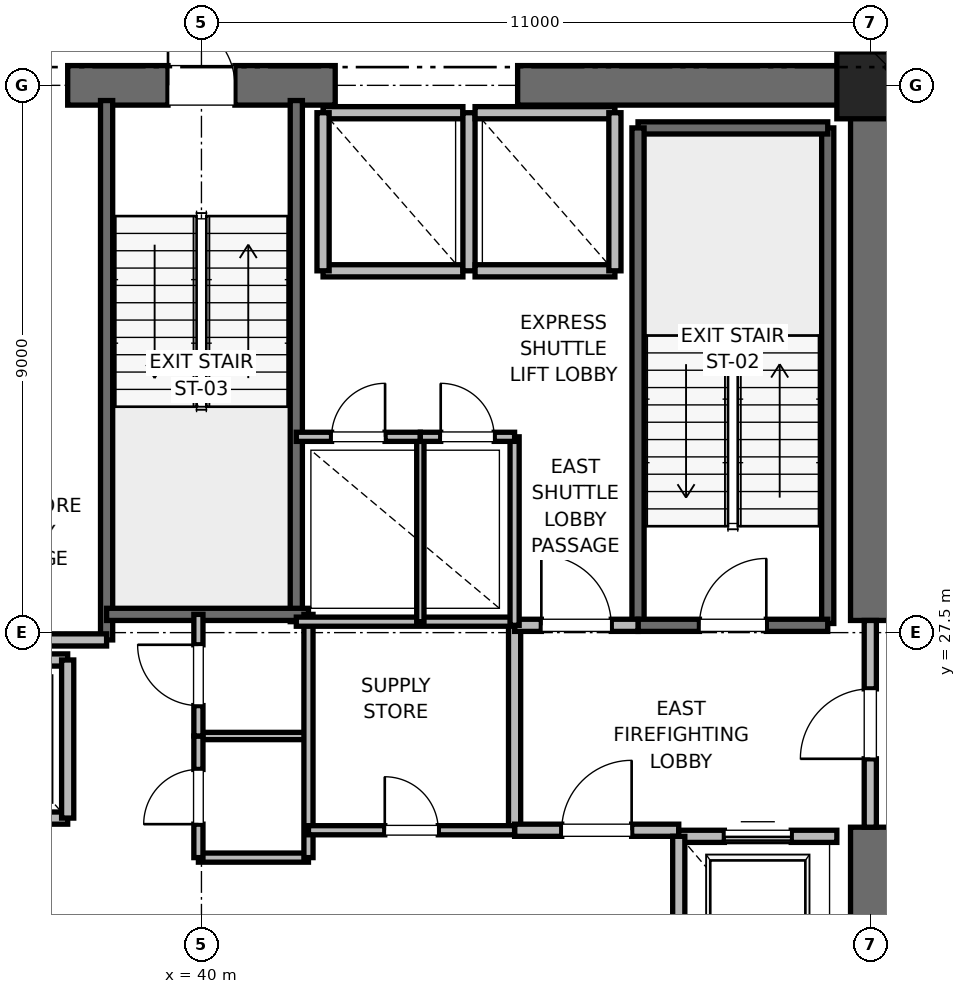
"""IFC4 building model, lengths in metres.
Left out: names, types, materials, properties, quantities, classifications, styles, units other than length and angle.
Written with IfcOpenShell. Run it as: python <this file> out.ifc"""

import sys

from ifc_helpers import new_model, si_unit, direction, frame, frame_2d, origin, origin_2d, place, context, subcontext, project, spatial, rectangle, extrude, element, fill, save


model = new_model("IFC4")
c1 = context("Model", 3, precision=1e-05, world=origin(), true_north=direction((0.0, 1.0)))
c2 = subcontext(c1, "Body", "Model", "MODEL_VIEW")
j1 = project(units=[si_unit("LENGTHUNIT", "METRE"), si_unit("PLANEANGLEUNIT", "RADIAN")], contexts=[c1])
p1 = place(None, origin())
s1 = spatial("IfcSite", under=j1, at=p1, CompositionType="ELEMENT")
p2 = place(p1, origin())
s2 = spatial("IfcBuilding", under=s1, at=p2, CompositionType="ELEMENT")
p3 = place(p2, frame((0.0, 0.0, 39.6)))
s3 = spatial("IfcBuildingStorey", under=s2, at=p3, CompositionType="ELEMENT", Elevation=39.6)
p4 = place(p3, frame((51.0, 36.5, 0.0), z_axis=(0.0, 0.0, 1.0), x_axis=(1.0, 0.0, 0.0)))
e1 = element("IfcColumn", 1, at=p4, inside=s3, PredefinedType="PILASTER", context=c2, shape_type="SweptSolid", body=[
    extrude(rectangle(XDim=1.1, YDim=1.1, at=origin_2d()), origin(), (0.0, 0.0, 1.0), 4.0),
])
p5 = place(p3, frame((37.8, 36.5, 0.0), z_axis=(0.0, 0.0, 1.0), x_axis=(1.0, 0.0, 0.0)))
e2 = element("IfcWall", 2, at=p5, inside=s3, PredefinedType="SHEAR", context=c2, shape_type="SweptSolid", body=[
    extrude(rectangle(XDim=4.4, YDim=0.65, at=frame_2d((2.2, 0.0))), origin(), (0.0, 0.0, 1.0), 3.76),
])
p6 = place(p5, frame((1.65, 0.0, 0.0)))
e3 = element("IfcOpeningElement", 3, at=p6, cuts=e2, PredefinedType="OPENING", context=c2, shape_type="SweptSolid", body=[
    extrude(rectangle(XDim=1.1, YDim=2.15, at=frame_2d((0.55, 1.075))), frame((0.0, 0.325, 0.0), z_axis=(0.0, -1.0, 0.0), x_axis=(1.0, 0.0, 0.0)), (0.0, 0.0, 1.0), 0.65),
])
for number, where, z_axis, x_axis in (
    (4, (45.2, 36.5, 0.0), (0.0, 0.0, 1.0), (1.0, 0.0, 0.0)),
    (5, (51.0, 18.5, 0.0), (0.0, 0.0, 1.0), (0.0, 1.0, 0.0)),
):
    element("IfcWall", number, at=place(p3, frame(where, z_axis=z_axis, x_axis=x_axis)), inside=s3, PredefinedType="SHEAR", context=c2, shape_type="SweptSolid", body=[
        extrude(rectangle(XDim=5.8, YDim=0.65, at=frame_2d((2.9, 0.0))), origin(), (0.0, 0.0, 1.0), 3.76),
    ])
p7 = place(p3, frame((51.0, 27.7, 0.0), z_axis=(0.0, 0.0, 1.0), x_axis=(0.0, 1.0, 0.0)))
e6 = element("IfcWall", 6, at=p7, inside=s3, PredefinedType="SHEAR", context=c2, shape_type="SweptSolid", body=[
    extrude(rectangle(XDim=8.8, YDim=0.65, at=frame_2d((4.4, 0.0))), origin(), (0.0, 0.0, 1.0), 3.76),
])
p8 = place(p3, frame((50.3, 27.65, 0.0), z_axis=(0.0, 0.0, 1.0), x_axis=(0.0, 1.0, 0.0)))
e7 = element("IfcWall", 7, at=p8, inside=s3, PredefinedType="SOLIDWALL", context=c2, shape_type="SweptSolid", body=[
    extrude(rectangle(XDim=8.15, YDim=0.2, at=frame_2d((4.075, 0.0))), origin(), (0.0, 0.0, 1.0), 3.76),
])
p9 = place(p3, frame((47.18, 35.8, 0.0), z_axis=(0.0, 0.0, 1.0), x_axis=(1.0, 0.0, 0.0)))
e8 = element("IfcWall", 8, at=p9, inside=s3, PredefinedType="SOLIDWALL", context=c2, shape_type="SweptSolid", body=[
    extrude(rectangle(XDim=3.12, YDim=0.2, at=frame_2d((1.56, 0.0))), origin(), (0.0, 0.0, 1.0), 3.76),
])
p10 = place(p3, frame((47.18, 27.62, 0.0), z_axis=(0.0, 0.0, 1.0), x_axis=(0.0, 1.0, 0.0)))
e9 = element("IfcWall", 9, at=p10, inside=s3, PredefinedType="SOLIDWALL", context=c2, shape_type="SweptSolid", body=[
    extrude(rectangle(XDim=8.18, YDim=0.2, at=frame_2d((4.09, 0.0))), origin(), (0.0, 0.0, 1.0), 3.76),
])
p11 = place(p3, frame((47.18, 27.62, 0.0), z_axis=(0.0, 0.0, 1.0), x_axis=(1.0, 0.0, 0.0)))
e10 = element("IfcWall", 10, at=p11, inside=s3, PredefinedType="SOLIDWALL", context=c2, shape_type="SweptSolid", body=[
    extrude(rectangle(XDim=3.12, YDim=0.2, at=frame_2d((1.56, 0.0))), origin(), (0.0, 0.0, 1.0), 3.76),
])
p12 = place(p11, frame((1.01, 0.0, 0.0)))
e11 = element("IfcOpeningElement", 11, at=p12, cuts=e10, PredefinedType="OPENING", context=c2, shape_type="SweptSolid", body=[
    extrude(rectangle(XDim=1.1, YDim=2.15, at=frame_2d((0.55, 1.075))), frame((0.0, 0.1, 0.0), z_axis=(0.0, -1.0, 0.0), x_axis=(1.0, 0.0, 0.0)), (0.0, 0.0, 1.0), 0.2),
])
p13 = place(p3, frame((38.44, 27.38, 0.0), z_axis=(0.0, 0.0, 1.0), x_axis=(0.0, 1.0, 0.0)))
e12 = element("IfcWall", 12, at=p13, inside=s3, PredefinedType="SOLIDWALL", context=c2, shape_type="SweptSolid", body=[
    extrude(rectangle(XDim=8.87, YDim=0.2, at=frame_2d((4.435, 0.0))), origin(), (0.0, 0.0, 1.0), 3.76),
])
p14 = place(p3, frame((41.56, 27.68, 0.0), z_axis=(0.0, 0.0, 1.0), x_axis=(0.0, 1.0, 0.0)))
e13 = element("IfcWall", 13, at=p14, inside=s3, PredefinedType="SOLIDWALL", context=c2, shape_type="SweptSolid", body=[
    extrude(rectangle(XDim=8.57, YDim=0.2, at=frame_2d((4.285, 0.0))), origin(), (0.0, 0.0, 1.0), 3.76),
])
p15 = place(p3, frame((38.44, 27.8, 0.0), z_axis=(0.0, 0.0, 1.0), x_axis=(1.0, 0.0, 0.0)))
e14 = element("IfcWall", 14, at=p15, inside=s3, PredefinedType="SOLIDWALL", context=c2, shape_type="SweptSolid", body=[
    extrude(rectangle(XDim=3.32, YDim=0.2, at=frame_2d((1.66, 0.0))), origin(), (0.0, 0.0, 1.0), 3.76),
])
p16 = place(p3, frame((32.82, 27.38, 0.0), z_axis=(0.0, 0.0, 1.0), x_axis=(1.0, 0.0, 0.0)))
e15 = element("IfcWall", 15, at=p16, inside=s3, PredefinedType="PARTITIONING", context=c2, shape_type="SweptSolid", body=[
    extrude(rectangle(XDim=5.62, YDim=0.2, at=frame_2d((2.81, 0.0))), origin(), (0.0, 0.0, 1.0), 3.76),
])
p17 = place(p3, frame((45.15, 24.25, 0.0), z_axis=(0.0, 0.0, 1.0), x_axis=(0.0, 1.0, 0.0)))
e16 = element("IfcWall", 16, at=p17, inside=s3, PredefinedType="PARTITIONING", context=c2, shape_type="SweptSolid", body=[
    extrude(rectangle(XDim=3.37, YDim=0.2, at=frame_2d((1.685, 0.0))), origin(), (0.0, 0.0, 1.0), 3.76),
])
p18 = place(p3, frame((45.15, 24.25, 0.0), z_axis=(0.0, 0.0, 1.0), x_axis=(1.0, 0.0, 0.0)))
e17 = element("IfcWall", 17, at=p18, inside=s3, PredefinedType="PARTITIONING", context=c2, shape_type="SweptSolid", body=[
    extrude(rectangle(XDim=2.7, YDim=0.2, at=frame_2d((1.35, 0.0))), origin(), (0.0, 0.0, 1.0), 3.76),
])
p19 = place(p18, frame((0.775, 0.0, 0.0)))
e18 = element("IfcOpeningElement", 18, at=p19, cuts=e17, PredefinedType="OPENING", context=c2, shape_type="SweptSolid", body=[
    extrude(rectangle(XDim=1.15, YDim=2.2, at=frame_2d((0.575, 1.1))), frame((0.0, 0.1, 0.0), z_axis=(0.0, -1.0, 0.0), x_axis=(1.0, 0.0, 0.0)), (0.0, 0.0, 1.0), 0.2),
])
p20 = place(p3, frame((45.15, 27.62, 0.0), z_axis=(0.0, 0.0, 1.0), x_axis=(1.0, 0.0, 0.0)))
e19 = element("IfcWall", 19, at=p20, inside=s3, PredefinedType="PARTITIONING", context=c2, shape_type="SweptSolid", body=[
    extrude(rectangle(XDim=2.03, YDim=0.2, at=frame_2d((1.015, 0.0))), origin(), (0.0, 0.0, 1.0), 3.76),
])
p21 = place(p20, frame((0.44, 0.0, 0.0)))
e20 = element("IfcOpeningElement", 20, at=p21, cuts=e19, PredefinedType="OPENING", context=c2, shape_type="SweptSolid", body=[
    extrude(rectangle(XDim=1.15, YDim=2.2, at=frame_2d((0.575, 1.1))), frame((0.0, 0.1, 0.0), z_axis=(0.0, -1.0, 0.0), x_axis=(1.0, 0.0, 0.0)), (0.0, 0.0, 1.0), 0.2),
])
p22 = place(p3, frame((51.0, 24.3, 0.0), z_axis=(0.0, 0.0, 1.0), x_axis=(0.0, 1.0, 0.0)))
e21 = element("IfcWall", 21, at=p22, inside=s3, PredefinedType="PARTITIONING", context=c2, shape_type="SweptSolid", body=[
    extrude(rectangle(XDim=3.4, YDim=0.2, at=frame_2d((1.7, 0.0))), origin(), (0.0, 0.0, 1.0), 2.54),
])
p23 = place(p22, frame((1.125, 0.0, 0.0)))
e22 = element("IfcOpeningElement", 22, at=p23, cuts=e21, PredefinedType="OPENING", context=c2, shape_type="SweptSolid", body=[
    extrude(rectangle(XDim=1.15, YDim=2.2, at=frame_2d((0.575, 1.1))), frame((0.0, 0.1, 0.0), z_axis=(0.0, -1.0, 0.0), x_axis=(1.0, 0.0, 0.0)), (0.0, 0.0, 1.0), 0.2),
])
p24 = place(p3, frame((50.45, 24.15, 0.0), z_axis=(0.0, 0.0, 1.0), x_axis=(-1.0, 0.0, 0.0)))
e23 = element("IfcWall", 23, at=p24, inside=s3, PredefinedType="SOLIDWALL", context=c2, shape_type="SweptSolid", body=[
    extrude(rectangle(XDim=2.6, YDim=0.2, at=frame_2d((1.3, 0.0))), origin(), (0.0, 0.0, 1.0), 2.54),
])
p25 = place(p24, frame((0.75, 0.0, 0.0)))
e24 = element("IfcOpeningElement", 24, at=p25, cuts=e23, PredefinedType="OPENING", context=c2, shape_type="SweptSolid", body=[
    extrude(rectangle(XDim=1.1, YDim=2.2, at=frame_2d((0.55, 1.1))), frame((0.0, 0.1, 0.0), z_axis=(0.0, -1.0, 0.0), x_axis=(1.0, 0.0, 0.0)), (0.0, 0.0, 1.0), 0.2),
])
p26 = place(p3, frame((47.85, 24.15, 0.0), z_axis=(0.0, 0.0, 1.0), x_axis=(0.0, -1.0, 0.0)))
e25 = element("IfcWall", 25, at=p26, inside=s3, PredefinedType="SOLIDWALL", context=c2, shape_type="SweptSolid", body=[
    extrude(rectangle(XDim=3.0, YDim=0.2, at=frame_2d((1.5, 0.0))), origin(), (0.0, 0.0, 1.0), 3.76),
])
p27 = place(p3, frame((35.5, 24.45, 0.0), z_axis=(0.0, 0.0, 1.0), x_axis=(1.0, 0.0, 0.0)))
e26 = element("IfcWall", 26, at=p27, inside=s3, PredefinedType="SOLIDWALL", context=c2, shape_type="SweptSolid", body=[
    extrude(rectangle(XDim=2.3, YDim=0.2, at=frame_2d((1.15, 0.0))), origin(), (0.0, 0.0, 1.0), 3.76),
])
p28 = place(p27, frame((0.6, 0.0, 0.0)))
e27 = element("IfcOpeningElement", 27, at=p28, cuts=e26, PredefinedType="OPENING", context=c2, shape_type="SweptSolid", body=[
    extrude(rectangle(XDim=1.1, YDim=2.2, at=frame_2d((0.55, 1.1))), frame((0.0, 0.1, 0.0), z_axis=(0.0, -1.0, 0.0), x_axis=(1.0, 0.0, 0.0)), (0.0, 0.0, 1.0), 0.2),
])
p29 = place(p3, frame((37.8, 27.05, 0.0), z_axis=(0.0, 0.0, 1.0), x_axis=(-1.0, 0.0, 0.0)))
e28 = element("IfcWall", 28, at=p29, inside=s3, PredefinedType="SOLIDWALL", context=c2, shape_type="SweptSolid", body=[
    extrude(rectangle(XDim=2.3, YDim=0.2, at=frame_2d((1.15, 0.0))), origin(), (0.0, 0.0, 1.0), 3.76),
])
p30 = place(p3, frame((37.8, 24.45, 0.0), z_axis=(0.0, 0.0, 1.0), x_axis=(0.0, 1.0, 0.0)))
e29 = element("IfcWall", 29, at=p30, inside=s3, PredefinedType="SOLIDWALL", context=c2, shape_type="SweptSolid", body=[
    extrude(rectangle(XDim=2.6, YDim=0.2, at=frame_2d((1.3, 0.0))), origin(), (0.0, 0.0, 1.0), 3.76),
])
p31 = place(p3, frame((42.0, 33.45, 0.0), z_axis=(0.0, 0.0, 1.0), x_axis=(1.0, 0.0, 0.0)))
e30 = element("IfcWall", 30, at=p31, inside=s3, PredefinedType="SOLIDWALL", context=c2, shape_type="SweptSolid", body=[
    extrude(rectangle(XDim=2.3, YDim=0.2, at=frame_2d((1.15, 0.0))), origin(), (0.0, 0.0, 1.0), 3.76),
])
p32 = place(p3, frame((44.3, 36.05, 0.0), z_axis=(0.0, 0.0, 1.0), x_axis=(-1.0, 0.0, 0.0)))
e31 = element("IfcWall", 31, at=p32, inside=s3, PredefinedType="SOLIDWALL", context=c2, shape_type="SweptSolid", body=[
    extrude(rectangle(XDim=2.3, YDim=0.2, at=frame_2d((1.15, 0.0))), origin(), (0.0, 0.0, 1.0), 2.54),
])
for number, where, z_axis, x_axis in (
    (32, (42.0, 36.05, 0.0), (0.0, 0.0, 1.0), (0.0, -1.0, 0.0)),
    (33, (44.4, 33.45, 0.0), (0.0, 0.0, 1.0), (0.0, 1.0, 0.0)),
):
    element("IfcWall", number, at=place(p3, frame(where, z_axis=z_axis, x_axis=x_axis)), inside=s3, PredefinedType="SOLIDWALL", context=c2, shape_type="SweptSolid", body=[
        extrude(rectangle(XDim=2.6, YDim=0.2, at=frame_2d((1.3, 0.0))), origin(), (0.0, 0.0, 1.0), 2.54),
    ])
p33 = place(p3, frame((44.5, 33.45, 0.0), z_axis=(0.0, 0.0, 1.0), x_axis=(1.0, 0.0, 0.0)))
e34 = element("IfcWall", 34, at=p33, inside=s3, PredefinedType="SOLIDWALL", context=c2, shape_type="SweptSolid", body=[
    extrude(rectangle(XDim=2.3, YDim=0.2, at=frame_2d((1.15, 0.0))), origin(), (0.0, 0.0, 1.0), 3.76),
])
p34 = place(p3, frame((46.8, 36.05, 0.0), z_axis=(0.0, 0.0, 1.0), x_axis=(-1.0, 0.0, 0.0)))
e35 = element("IfcWall", 35, at=p34, inside=s3, PredefinedType="SOLIDWALL", context=c2, shape_type="SweptSolid", body=[
    extrude(rectangle(XDim=2.3, YDim=0.2, at=frame_2d((1.15, 0.0))), origin(), (0.0, 0.0, 1.0), 2.54),
])
p35 = place(p3, frame((46.8, 33.45, 0.0), z_axis=(0.0, 0.0, 1.0), x_axis=(0.0, 1.0, 0.0)))
e36 = element("IfcWall", 36, at=p35, inside=s3, PredefinedType="SOLIDWALL", context=c2, shape_type="SweptSolid", body=[
    extrude(rectangle(XDim=2.6, YDim=0.2, at=frame_2d((1.3, 0.0))), origin(), (0.0, 0.0, 1.0), 3.76),
])
p36 = place(p3, frame((39.95, 23.8, 0.0), z_axis=(0.0, 0.0, 1.0), x_axis=(1.0, 0.0, 0.0)))
e37 = element("IfcWall", 37, at=p36, inside=s3, PredefinedType="PARTITIONING", context=c2, shape_type="SweptSolid", body=[
    extrude(rectangle(XDim=1.81, YDim=0.15, at=frame_2d((0.905, 0.0))), origin(), (0.0, 0.0, 1.0), 2.85),
])
p37 = place(p3, frame((39.95, 25.8, 0.0), z_axis=(0.0, 0.0, 1.0), x_axis=(1.0, 0.0, 0.0)))
e38 = element("IfcWall", 38, at=p37, inside=s3, PredefinedType="PARTITIONING", context=c2, shape_type="SweptSolid", body=[
    extrude(rectangle(XDim=1.81, YDim=0.12, at=frame_2d((0.905, 0.0))), origin(), (0.0, 0.0, 1.0), 2.85),
])
p38 = place(p3, frame((41.76, 23.8, 0.0), z_axis=(0.0, 0.0, 1.0), x_axis=(0.0, 1.0, 0.0)))
e39 = element("IfcWall", 39, at=p38, inside=s3, PredefinedType="PARTITIONING", context=c2, shape_type="SweptSolid", body=[
    extrude(rectangle(XDim=4.0, YDim=0.15, at=frame_2d((2.0, 0.0))), origin(), (0.0, 0.0, 1.0), 2.85),
])
p39 = place(p3, frame((39.95, 23.8, 0.0), z_axis=(0.0, 0.0, 1.0), x_axis=(0.0, 1.0, 0.0)))
e40 = element("IfcWall", 40, at=p39, inside=s3, PredefinedType="PARTITIONING", context=c2, shape_type="SweptSolid", body=[
    extrude(rectangle(XDim=2.0, YDim=0.15, at=frame_2d((1.0, 0.0))), origin(), (0.0, 0.0, 1.0), 2.85),
])
p40 = place(p39, frame((0.55, 0.0, 0.0)))
e41 = element("IfcOpeningElement", 41, at=p40, cuts=e40, PredefinedType="OPENING", context=c2, shape_type="SweptSolid", body=[
    extrude(rectangle(XDim=0.9, YDim=2.1, at=frame_2d((0.45, 1.05))), frame((0.0, 0.075, 0.0), z_axis=(0.0, -1.0, 0.0), x_axis=(1.0, 0.0, 0.0)), (0.0, 0.0, 1.0), 0.15),
])
p41 = place(p3, frame((39.95, 25.8, 0.0), z_axis=(0.0, 0.0, 1.0), x_axis=(0.0, 1.0, 0.0)))
e42 = element("IfcWall", 42, at=p41, inside=s3, PredefinedType="PARTITIONING", context=c2, shape_type="SweptSolid", body=[
    extrude(rectangle(XDim=2.0, YDim=0.15, at=frame_2d((1.0, 0.0))), origin(), (0.0, 0.0, 1.0), 2.85),
])
p42 = place(p41, frame((0.5, 0.0, 0.0)))
e43 = element("IfcOpeningElement", 43, at=p42, cuts=e42, PredefinedType="OPENING", context=c2, shape_type="SweptSolid", body=[
    extrude(rectangle(XDim=1.0, YDim=2.15, at=frame_2d((0.5, 1.075))), frame((0.0, 0.075, 0.0), z_axis=(0.0, -1.0, 0.0), x_axis=(1.0, 0.0, 0.0)), (0.0, 0.0, 1.0), 0.15),
])
p43 = place(p3, frame((41.56, 27.68, 0.0), z_axis=(0.0, 0.0, 1.0), x_axis=(1.0, 0.0, 0.0)))
e44 = element("IfcWall", 44, at=p43, inside=s3, PredefinedType="PARTITIONING", context=c2, shape_type="SweptSolid", body=[
    extrude(rectangle(XDim=3.59, YDim=0.15, at=frame_2d((1.795, 0.0))), origin(), (0.0, 0.0, 1.0), 2.85),
])
p44 = place(p3, frame((41.76, 24.25, 0.0), z_axis=(0.0, 0.0, 1.0), x_axis=(1.0, 0.0, 0.0)))
e45 = element("IfcWall", 45, at=p44, inside=s3, PredefinedType="PARTITIONING", context=c2, shape_type="SweptSolid", body=[
    extrude(rectangle(XDim=3.39, YDim=0.15, at=frame_2d((1.695, 0.0))), origin(), (0.0, 0.0, 1.0), 2.85),
])
p45 = place(p44, frame((1.255, 0.0, 0.0)))
e46 = element("IfcOpeningElement", 46, at=p45, cuts=e45, PredefinedType="OPENING", context=c2, shape_type="SweptSolid", body=[
    extrude(rectangle(XDim=0.88, YDim=2.1, at=frame_2d((0.44, 1.05))), frame((0.0, 0.075, 0.0), z_axis=(0.0, -1.0, 0.0), x_axis=(1.0, 0.0, 0.0)), (0.0, 0.0, 1.0), 0.15),
])
p46 = place(p3, frame((45.15, 27.62, 0.0), z_axis=(0.0, 0.0, 1.0), x_axis=(0.0, 1.0, 0.0)))
e47 = element("IfcWall", 47, at=p46, inside=s3, PredefinedType="PARTITIONING", context=c2, shape_type="SweptSolid", body=[
    extrude(rectangle(XDim=3.1, YDim=0.15, at=frame_2d((1.55, 0.0))), origin(), (0.0, 0.0, 1.0), 2.85),
])
p47 = place(p3, frame((43.6, 27.68, 0.0), z_axis=(0.0, 0.0, 1.0), x_axis=(0.0, 1.0, 0.0)))
e48 = element("IfcWall", 48, at=p47, inside=s3, PredefinedType="PARTITIONING", context=c2, shape_type="SweptSolid", body=[
    extrude(rectangle(XDim=3.04, YDim=0.12, at=frame_2d((1.52, 0.0))), origin(), (0.0, 0.0, 1.0), 2.85),
])
p48 = place(p3, frame((41.56, 30.72, 0.0), z_axis=(0.0, 0.0, 1.0), x_axis=(1.0, 0.0, 0.0)))
e49 = element("IfcWall", 49, at=p48, inside=s3, PredefinedType="PARTITIONING", context=c2, shape_type="SweptSolid", body=[
    extrude(rectangle(XDim=2.04, YDim=0.15, at=frame_2d((1.02, 0.0))), origin(), (0.0, 0.0, 1.0), 2.85),
])
p49 = place(p48, frame((0.58, 0.0, 0.0)))
e50 = element("IfcOpeningElement", 50, at=p49, cuts=e49, PredefinedType="OPENING", context=c2, shape_type="SweptSolid", body=[
    extrude(rectangle(XDim=0.88, YDim=2.1, at=frame_2d((0.44, 1.05))), frame((0.0, 0.075, 0.0), z_axis=(0.0, -1.0, 0.0), x_axis=(1.0, 0.0, 0.0)), (0.0, 0.0, 1.0), 0.15),
])
p50 = place(p3, frame((43.6, 30.72, 0.0), z_axis=(0.0, 0.0, 1.0), x_axis=(1.0, 0.0, 0.0)))
e51 = element("IfcWall", 51, at=p50, inside=s3, PredefinedType="PARTITIONING", context=c2, shape_type="SweptSolid", body=[
    extrude(rectangle(XDim=1.55, YDim=0.15, at=frame_2d((0.775, 0.0))), origin(), (0.0, 0.0, 1.0), 2.85),
])
p51 = place(p50, frame((0.335, 0.0, 0.0)))
e52 = element("IfcOpeningElement", 52, at=p51, cuts=e51, PredefinedType="OPENING", context=c2, shape_type="SweptSolid", body=[
    extrude(rectangle(XDim=0.88, YDim=2.1, at=frame_2d((0.44, 1.05))), frame((0.0, 0.075, 0.0), z_axis=(0.0, -1.0, 0.0), x_axis=(1.0, 0.0, 0.0)), (0.0, 0.0, 1.0), 0.15),
])
p52 = place(p12, origin())
e53 = element("IfcDoor", 53, at=p52, inside=s3, OperationType="SINGLE_SWING_RIGHT", PredefinedType="DOOR", context=c2, shape_type="SweptSolid", body=[
    extrude(rectangle(XDim=1.1, YDim=2.15, at=frame_2d((0.55, 1.075))), frame((0.0, 0.025, 0.0), z_axis=(0.0, -1.0, 0.0), x_axis=(1.0, 0.0, 0.0)), (0.0, 0.0, 1.0), 0.05),
])
fill(e11, e53)
p53 = place(p6, origin())
e54 = element("IfcDoor", 54, at=p53, inside=s3, OperationType="SINGLE_SWING_LEFT", PredefinedType="DOOR", context=c2, shape_type="SweptSolid", body=[
    extrude(rectangle(XDim=1.1, YDim=2.15, at=frame_2d((0.55, 1.075))), frame((0.0, 0.025, 0.0), z_axis=(0.0, -1.0, 0.0), x_axis=(1.0, 0.0, 0.0)), (0.0, 0.0, 1.0), 0.05),
])
fill(e3, e54)
p54 = place(p19, origin())
e55 = element("IfcDoor", 55, at=p54, inside=s3, OperationType="SINGLE_SWING_RIGHT", PredefinedType="DOOR", context=c2, shape_type="SweptSolid", body=[
    extrude(rectangle(XDim=1.15, YDim=2.2, at=frame_2d((0.575, 1.1))), frame((0.0, 0.025, 0.0), z_axis=(0.0, -1.0, 0.0), x_axis=(1.0, 0.0, 0.0)), (0.0, 0.0, 1.0), 0.05),
])
fill(e18, e55)
p55 = place(p21, origin())
e56 = element("IfcDoor", 56, at=p55, inside=s3, OperationType="SINGLE_SWING_LEFT", PredefinedType="DOOR", context=c2, shape_type="SweptSolid", body=[
    extrude(rectangle(XDim=1.15, YDim=2.2, at=frame_2d((0.575, 1.1))), frame((0.0, 0.025, 0.0), z_axis=(0.0, -1.0, 0.0), x_axis=(1.0, 0.0, 0.0)), (0.0, 0.0, 1.0), 0.05),
])
fill(e20, e56)
p56 = place(p23, origin())
e57 = element("IfcDoor", 57, at=p56, inside=s3, OperationType="SINGLE_SWING_LEFT", PredefinedType="DOOR", context=c2, shape_type="SweptSolid", body=[
    extrude(rectangle(XDim=1.15, YDim=2.2, at=frame_2d((0.575, 1.1))), frame((0.0, 0.025, 0.0), z_axis=(0.0, -1.0, 0.0), x_axis=(1.0, 0.0, 0.0)), (0.0, 0.0, 1.0), 0.05),
])
fill(e22, e57)
p57 = place(p25, origin())
e58 = element("IfcDoor", 58, at=p57, inside=s3, OperationType="SLIDING_TO_RIGHT", PredefinedType="DOOR", context=c2, shape_type="SweptSolid", body=[
    extrude(rectangle(XDim=1.1, YDim=2.2, at=frame_2d((0.55, 1.1))), frame((0.0, 0.025, 0.0), z_axis=(0.0, -1.0, 0.0), x_axis=(1.0, 0.0, 0.0)), (0.0, 0.0, 1.0), 0.05),
])
fill(e24, e58)
p58 = place(p40, origin())
e59 = element("IfcDoor", 59, at=p58, inside=s3, OperationType="SINGLE_SWING_LEFT", PredefinedType="DOOR", context=c2, shape_type="SweptSolid", body=[
    extrude(rectangle(XDim=0.9, YDim=2.1, at=frame_2d((0.45, 1.05))), frame((0.0, 0.025, 0.0), z_axis=(0.0, -1.0, 0.0), x_axis=(1.0, 0.0, 0.0)), (0.0, 0.0, 1.0), 0.05),
])
fill(e41, e59)
p59 = place(p42, origin())
e60 = element("IfcDoor", 60, at=p59, inside=s3, OperationType="SINGLE_SWING_RIGHT", PredefinedType="DOOR", context=c2, shape_type="SweptSolid", body=[
    extrude(rectangle(XDim=1.0, YDim=2.15, at=frame_2d((0.5, 1.075))), frame((0.0, 0.025, 0.0), z_axis=(0.0, -1.0, 0.0), x_axis=(1.0, 0.0, 0.0)), (0.0, 0.0, 1.0), 0.05),
])
fill(e43, e60)
p60 = place(p45, origin())
e61 = element("IfcDoor", 61, at=p60, inside=s3, OperationType="SINGLE_SWING_LEFT", PredefinedType="DOOR", context=c2, shape_type="SweptSolid", body=[
    extrude(rectangle(XDim=0.88, YDim=2.1, at=frame_2d((0.44, 1.05))), frame((0.0, 0.025, 0.0), z_axis=(0.0, -1.0, 0.0), x_axis=(1.0, 0.0, 0.0)), (0.0, 0.0, 1.0), 0.05),
])
fill(e46, e61)
p61 = place(p49, origin())
e62 = element("IfcDoor", 62, at=p61, inside=s3, OperationType="SINGLE_SWING_RIGHT", PredefinedType="DOOR", context=c2, shape_type="SweptSolid", body=[
    extrude(rectangle(XDim=0.88, YDim=2.1, at=frame_2d((0.44, 1.05))), frame((0.0, 0.025, 0.0), z_axis=(0.0, -1.0, 0.0), x_axis=(1.0, 0.0, 0.0)), (0.0, 0.0, 1.0), 0.05),
])
fill(e50, e62)
p62 = place(p51, origin())
e63 = element("IfcDoor", 63, at=p62, inside=s3, OperationType="SINGLE_SWING_LEFT", PredefinedType="DOOR", context=c2, shape_type="SweptSolid", body=[
    extrude(rectangle(XDim=0.88, YDim=2.1, at=frame_2d((0.44, 1.05))), frame((0.0, 0.025, 0.0), z_axis=(0.0, -1.0, 0.0), x_axis=(1.0, 0.0, 0.0)), (0.0, 0.0, 1.0), 0.05),
])
fill(e52, e63)
save(model, sys.argv[1])
